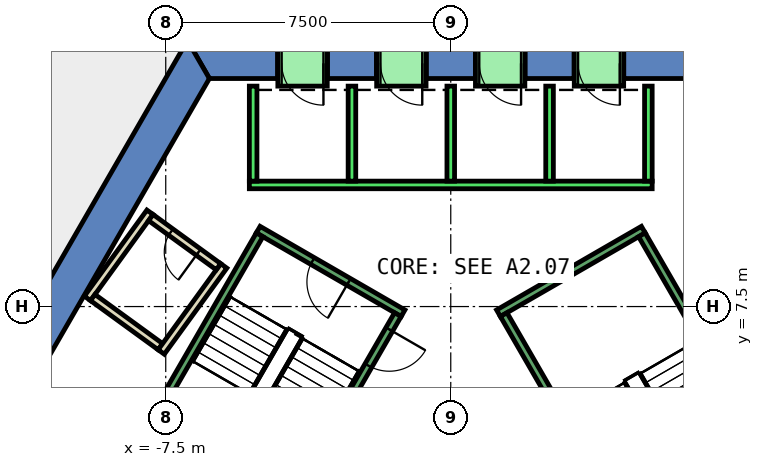
"""IFC4 building model, lengths in metres.
Left out: names, types, materials, properties, quantities, classifications, styles, units other than length and angle.
Written with IfcOpenShell. Run it as: python <this file> out.ifc"""

import sys

from ifc_helpers import new_model, si_unit, direction, frame, frame_2d, origin, place, context, subcontext, project, spatial, polyline, rectangle, outline, extrude, element, fill, save


model = new_model("IFC4")
c1 = context("Model", 3, precision=1e-05, world=origin(), true_north=direction((0.0, 1.0)))
c2 = subcontext(c1, "Body", "Model", "MODEL_VIEW")
j1 = project(units=[si_unit("LENGTHUNIT", "METRE"), si_unit("PLANEANGLEUNIT", "RADIAN")], contexts=[c1])
p1 = place(None, origin())
s1 = spatial("IfcSite", under=j1, at=p1, CompositionType="ELEMENT")
p2 = place(p1, origin())
s2 = spatial("IfcBuilding", under=s1, at=p2, CompositionType="ELEMENT")
p3 = place(p2, frame((0.0, 0.0, 20.0)))
s3 = spatial("IfcBuildingStorey", under=s2, at=p3, CompositionType="ELEMENT", Elevation=20.0)
p4 = place(p3, frame((0.0, 0.0, -0.45)))
e1 = element("IfcWall", 1, at=p4, inside=s3, PredefinedType="SHEAR", context=c2, shape_type="SweptSolid", body=[
    extrude(outline(polyline([(4.55, 14.5), (4.55, 13.5), (6.351, 13.5), (6.928, 14.5), (4.55, 14.5)])), origin(), (0.0, 0.0, 1.0), 5.0),
])
p5 = place(p3, frame((0.0, 0.0, -0.45)))
e2 = element("IfcWall", 2, at=p5, inside=s3, PredefinedType="SHEAR", context=c2, shape_type="SweptSolid", body=[
    extrude(outline(polyline([(1.95, 14.5), (1.95, 13.5), (3.25, 13.5), (3.25, 14.5), (1.95, 14.5)])), origin(), (0.0, 0.0, 1.0), 5.0),
])
p6 = place(p3, frame((0.0, 0.0, -0.45)))
e3 = element("IfcWall", 3, at=p6, inside=s3, PredefinedType="SHEAR", context=c2, shape_type="SweptSolid", body=[
    extrude(outline(polyline([(-0.65, 14.5), (-0.65, 13.5), (0.65, 13.5), (0.65, 14.5), (-0.65, 14.5)])), origin(), (0.0, 0.0, 1.0), 5.0),
])
p7 = place(p3, frame((0.0, 0.0, -0.45)))
e4 = element("IfcWall", 4, at=p7, inside=s3, PredefinedType="SHEAR", context=c2, shape_type="SweptSolid", body=[
    extrude(outline(polyline([(-3.25, 14.5), (-3.25, 13.5), (-1.95, 13.5), (-1.95, 14.5), (-3.25, 14.5)])), origin(), (0.0, 0.0, 1.0), 5.0),
])
p8 = place(p3, frame((0.0, 0.0, -0.45)))
e5 = element("IfcWall", 5, at=p8, inside=s3, PredefinedType="SHEAR", context=c2, shape_type="SweptSolid", body=[
    extrude(outline(polyline([(-4.55, 13.5), (-4.55, 14.5), (-6.928, 14.5), (-6.351, 13.5), (-4.55, 13.5)])), origin(), (0.0, 0.0, 1.0), 5.0),
])
p9 = place(p3, frame((0.0, 0.0, 3.6)))
e6 = element("IfcWall", 6, at=p9, inside=s3, PredefinedType="SHEAR", context=c2, shape_type="SweptSolid", body=[
    extrude(outline(polyline([(3.25, 14.5), (3.25, 13.5), (4.55, 13.5), (4.55, 14.5), (3.25, 14.5)])), origin(), (0.0, 0.0, 1.0), 0.95),
])
p10 = place(p3, frame((0.0, 0.0, 3.6)))
e7 = element("IfcWall", 7, at=p10, inside=s3, PredefinedType="SHEAR", context=c2, shape_type="SweptSolid", body=[
    extrude(outline(polyline([(0.65, 14.5), (0.65, 13.5), (1.95, 13.5), (1.95, 14.5), (0.65, 14.5)])), origin(), (0.0, 0.0, 1.0), 0.95),
])
p11 = place(p3, frame((0.0, 0.0, 3.6)))
e8 = element("IfcWall", 8, at=p11, inside=s3, PredefinedType="SHEAR", context=c2, shape_type="SweptSolid", body=[
    extrude(outline(polyline([(-1.95, 14.5), (-1.95, 13.5), (-0.65, 13.5), (-0.65, 14.5), (-1.95, 14.5)])), origin(), (0.0, 0.0, 1.0), 0.95),
])
p12 = place(p3, frame((0.0, 0.0, 3.6)))
e9 = element("IfcWall", 9, at=p12, inside=s3, PredefinedType="SHEAR", context=c2, shape_type="SweptSolid", body=[
    extrude(outline(polyline([(-4.55, 14.5), (-4.55, 13.5), (-3.25, 13.5), (-3.25, 14.5), (-4.55, 14.5)])), origin(), (0.0, 0.0, 1.0), 0.95),
])
p13 = place(p3, frame((0.0, 0.0, -0.45)))
e10 = element("IfcWall", 10, at=p13, inside=s3, PredefinedType="SHEAR", context=c2, shape_type="SweptSolid", body=[
    extrude(outline(polyline([(-12.267, 5.252), (-11.402, 4.752), (-6.351, 13.5), (-6.928, 14.5), (-12.267, 5.252)])), origin(), (0.0, 0.0, 1.0), 5.0),
])
p14 = place(p3, frame((-7.915, 9.981, 0.0), z_axis=(0.0, 0.0, 1.0), x_axis=(-0.587497525331, -0.809225962096, 0.0)))
e11 = element("IfcWall", 11, at=p14, inside=s3, PredefinedType="PARTITIONING", context=c2, shape_type="SweptSolid", body=[
    extrude(rectangle(XDim=2.8, YDim=0.2, at=frame_2d((1.4, 0.0))), origin(), (0.0, 0.0, 1.0), 4.55),
])
p15 = place(p3, frame((-9.421, 7.738, 0.0), z_axis=(0.0, 0.0, 1.0), x_axis=(0.808832031072, -0.588039748242, 0.0)))
e12 = element("IfcWall", 12, at=p15, inside=s3, PredefinedType="PARTITIONING", context=c2, shape_type="SweptSolid", body=[
    extrude(rectangle(XDim=2.2, YDim=0.2, at=frame_2d((1.1, 0.0))), origin(), (0.0, 0.0, 1.0), 4.55),
])
p16 = place(p3, frame((-7.619, 6.305, 0.0), z_axis=(0.0, 0.0, 1.0), x_axis=(0.58785021813, 0.808969789945, 0.0)))
e13 = element("IfcWall", 13, at=p16, inside=s3, PredefinedType="PARTITIONING", context=c2, shape_type="SweptSolid", body=[
    extrude(rectangle(XDim=2.8, YDim=0.2, at=frame_2d((1.4, 0.0))), origin(), (0.0, 0.0, 1.0), 4.55),
])
p17 = place(p3, frame((-6.113, 8.548, 0.0), z_axis=(0.0, 0.0, 1.0), x_axis=(-0.808928058073, 0.587907643139, 0.0)))
e14 = element("IfcWall", 14, at=p17, inside=s3, PredefinedType="PARTITIONING", context=c2, shape_type="SweptSolid", body=[
    extrude(rectangle(XDim=2.199, YDim=0.2, at=frame_2d((1.1, 0.0))), origin(), (0.0, 0.0, 1.0), 4.55),
])
p18 = place(p17, frame((0.65, 0.0, 0.0)))
e15 = element("IfcOpeningElement", 15, at=p18, cuts=e14, PredefinedType="OPENING", context=c2, shape_type="SweptSolid", body=[
    extrude(rectangle(XDim=0.9, YDim=2.1, at=frame_2d((0.45, 1.05))), frame((0.0, 0.11, 0.0), z_axis=(0.0, -1.0, 0.0), x_axis=(1.0, 0.0, 0.0)), (0.0, 0.0, 1.0), 0.22),
])
p19 = place(p3, frame((5.3, 10.7, 0.0), z_axis=(0.0, 0.0, 1.0), x_axis=(-1.0, 0.0, 0.0)))
e16 = element("IfcWall", 16, at=p19, inside=s3, PredefinedType="STANDARD", context=c2, shape_type="SweptSolid", body=[
    extrude(rectangle(XDim=10.6, YDim=0.2, at=frame_2d((5.3, 0.0))), origin(), (0.0, 0.0, 1.0), 4.55),
])
for number, where, z_axis, x_axis in (
    (17, (5.2, 10.8, 0.0), (0.0, 0.0, 1.0), (0.0, 1.0, 0.0)),
    (18, (2.6, 10.8, 0.0), (0.0, 0.0, 1.0), (0.0, 1.0, 0.0)),
    (19, (0.0, 10.8, 0.0), (0.0, 0.0, 1.0), (0.0, 1.0, 0.0)),
    (20, (-2.6, 10.8, 0.0), (0.0, 0.0, 1.0), (0.0, 1.0, 0.0)),
    (21, (-5.2, 10.8, 0.0), (0.0, 0.0, 1.0), (0.0, 1.0, 0.0)),
):
    element("IfcWall", number, at=place(p3, frame(where, z_axis=z_axis, x_axis=x_axis)), inside=s3, PredefinedType="STANDARD", context=c2, shape_type="SweptSolid", body=[
        extrude(rectangle(XDim=2.5, YDim=0.2, at=frame_2d((1.25, 0.0))), origin(), (0.0, 0.0, 1.0), 4.55),
    ])
p20 = place(p3, frame((4.55, 13.9, 0.0), z_axis=(0.0, 0.0, 1.0), x_axis=(-1.0, 0.0, 0.0)))
e22 = element("IfcWall", 22, at=p20, inside=s3, PredefinedType="STANDARD", context=c2, shape_type="SweptSolid", body=[
    extrude(rectangle(XDim=1.3, YDim=1.2, at=frame_2d((0.65, 0.0))), origin(), (0.0, 0.0, 1.0), 2.4),
])
p21 = place(p20, frame((0.1, 0.0, 0.0)))
e23 = element("IfcOpeningElement", 23, at=p21, cuts=e22, PredefinedType="OPENING", context=c2, shape_type="SweptSolid", body=[
    extrude(rectangle(XDim=1.1, YDim=2.3, at=frame_2d((0.55, 1.15))), frame((0.0, 0.61, 0.0), z_axis=(0.0, -1.0, 0.0), x_axis=(1.0, 0.0, 0.0)), (0.0, 0.0, 1.0), 1.22),
])
p22 = place(p3, frame((1.95, 13.9, 0.0), z_axis=(0.0, 0.0, 1.0), x_axis=(-1.0, 0.0, 0.0)))
e24 = element("IfcWall", 24, at=p22, inside=s3, PredefinedType="STANDARD", context=c2, shape_type="SweptSolid", body=[
    extrude(rectangle(XDim=1.3, YDim=1.2, at=frame_2d((0.65, 0.0))), origin(), (0.0, 0.0, 1.0), 2.4),
])
p23 = place(p22, frame((0.1, 0.0, 0.0)))
e25 = element("IfcOpeningElement", 25, at=p23, cuts=e24, PredefinedType="OPENING", context=c2, shape_type="SweptSolid", body=[
    extrude(rectangle(XDim=1.1, YDim=2.3, at=frame_2d((0.55, 1.15))), frame((0.0, 0.61, 0.0), z_axis=(0.0, -1.0, 0.0), x_axis=(1.0, 0.0, 0.0)), (0.0, 0.0, 1.0), 1.22),
])
p24 = place(p3, frame((-0.65, 13.9, 0.0), z_axis=(0.0, 0.0, 1.0), x_axis=(-1.0, 0.0, 0.0)))
e26 = element("IfcWall", 26, at=p24, inside=s3, PredefinedType="STANDARD", context=c2, shape_type="SweptSolid", body=[
    extrude(rectangle(XDim=1.3, YDim=1.2, at=frame_2d((0.65, 0.0))), origin(), (0.0, 0.0, 1.0), 2.4),
])
p25 = place(p24, frame((0.1, 0.0, 0.0)))
e27 = element("IfcOpeningElement", 27, at=p25, cuts=e26, PredefinedType="OPENING", context=c2, shape_type="SweptSolid", body=[
    extrude(rectangle(XDim=1.1, YDim=2.3, at=frame_2d((0.55, 1.15))), frame((0.0, 0.61, 0.0), z_axis=(0.0, -1.0, 0.0), x_axis=(1.0, 0.0, 0.0)), (0.0, 0.0, 1.0), 1.22),
])
p26 = place(p3, frame((-3.25, 13.9, 0.0), z_axis=(0.0, 0.0, 1.0), x_axis=(-1.0, 0.0, 0.0)))
e28 = element("IfcWall", 28, at=p26, inside=s3, PredefinedType="STANDARD", context=c2, shape_type="SweptSolid", body=[
    extrude(rectangle(XDim=1.3, YDim=1.2, at=frame_2d((0.65, 0.0))), origin(), (0.0, 0.0, 1.0), 2.4),
])
p27 = place(p26, frame((0.1, 0.0, 0.0)))
e29 = element("IfcOpeningElement", 29, at=p27, cuts=e28, PredefinedType="OPENING", context=c2, shape_type="SweptSolid", body=[
    extrude(rectangle(XDim=1.1, YDim=2.3, at=frame_2d((0.55, 1.15))), frame((0.0, 0.61, 0.0), z_axis=(0.0, -1.0, 0.0), x_axis=(1.0, 0.0, 0.0)), (0.0, 0.0, 1.0), 1.22),
])
p28 = place(p3, frame((1.256, 7.324, 0.0), z_axis=(0.0, 0.0, 1.0), x_axis=(0.866046073146, 0.499964197906, 0.0)))
e30 = element("IfcWall", 30, at=p28, inside=s3, PredefinedType="STANDARD", context=c2, shape_type="SweptSolid", body=[
    extrude(rectangle(XDim=4.4, YDim=0.2, at=frame_2d((2.2, 0.0))), origin(), (0.0, 0.0, 1.0), 4.55),
])
p29 = place(p3, frame((4.843, 1.312, 0.0), z_axis=(0.0, 0.0, 1.0), x_axis=(-0.499963383562, 0.866046543262, 0.0)))
e31 = element("IfcWall", 31, at=p29, inside=s3, PredefinedType="STANDARD", context=c2, shape_type="SweptSolid", body=[
    extrude(rectangle(XDim=6.9, YDim=0.2, at=frame_2d((3.45, 0.0))), origin(), (0.0, 0.0, 1.0), 4.55),
])
p30 = place(p29, frame((0.45, 0.0, 0.0)))
e32 = element("IfcOpeningElement", 32, at=p30, cuts=e31, PredefinedType="OPENING", context=c2, shape_type="SweptSolid", body=[
    extrude(rectangle(XDim=1.1, YDim=2.2, at=frame_2d((0.55, 1.1))), frame((0.0, 0.11, 0.0), z_axis=(0.0, -1.0, 0.0), x_axis=(1.0, 0.0, 0.0)), (0.0, 0.0, 1.0), 0.22),
])
p31 = place(p3, frame((8.48, 3.412, 0.0), z_axis=(0.0, 0.0, 1.0), x_axis=(-0.499978703459, 0.866037698999, 0.0)))
e33 = element("IfcWall", 33, at=p31, inside=s3, PredefinedType="STANDARD", context=c2, shape_type="SweptSolid", body=[
    extrude(rectangle(XDim=6.9, YDim=0.2, at=frame_2d((3.45, 0.0))), origin(), (0.0, 0.0, 1.0), 4.55),
])
p32 = place(p3, frame((-1.256, 7.324, 0.0), z_axis=(0.0, 0.0, 1.0), x_axis=(-0.866046073146, 0.499964197906, 0.0)))
e34 = element("IfcWall", 34, at=p32, inside=s3, PredefinedType="STANDARD", context=c2, shape_type="SweptSolid", body=[
    extrude(rectangle(XDim=4.4, YDim=0.2, at=frame_2d((2.2, 0.0))), origin(), (0.0, 0.0, 1.0), 4.55),
])
p33 = place(p32, frame((1.65, 0.0, 0.0)))
e35 = element("IfcOpeningElement", 35, at=p33, cuts=e34, PredefinedType="OPENING", context=c2, shape_type="SweptSolid", body=[
    extrude(rectangle(XDim=1.1, YDim=2.2, at=frame_2d((0.55, 1.1))), frame((0.0, 0.11, 0.0), z_axis=(0.0, -1.0, 0.0), x_axis=(1.0, 0.0, 0.0)), (0.0, 0.0, 1.0), 0.22),
])
p34 = place(p3, frame((-1.393, 7.288, 0.0), z_axis=(0.0, 0.0, 1.0), x_axis=(-0.499963383562, -0.866046543262, 0.0)))
e36 = element("IfcWall", 36, at=p34, inside=s3, PredefinedType="STANDARD", context=c2, shape_type="SweptSolid", body=[
    extrude(rectangle(XDim=6.9, YDim=0.2, at=frame_2d((3.45, 0.0))), origin(), (0.0, 0.0, 1.0), 4.55),
])
p35 = place(p34, frame((0.45, 0.0, 0.0)))
e37 = element("IfcOpeningElement", 37, at=p35, cuts=e36, PredefinedType="OPENING", context=c2, shape_type="SweptSolid", body=[
    extrude(rectangle(XDim=1.1, YDim=2.2, at=frame_2d((0.55, 1.1))), frame((0.0, 0.11, 0.0), z_axis=(0.0, -1.0, 0.0), x_axis=(1.0, 0.0, 0.0)), (0.0, 0.0, 1.0), 0.22),
])
p36 = place(p3, frame((-5.03, 9.388, 0.0), z_axis=(0.0, 0.0, 1.0), x_axis=(-0.499978703459, -0.866037698999, 0.0)))
e38 = element("IfcWall", 38, at=p36, inside=s3, PredefinedType="STANDARD", context=c2, shape_type="SweptSolid", body=[
    extrude(rectangle(XDim=6.9, YDim=0.2, at=frame_2d((3.45, 0.0))), origin(), (0.0, 0.0, 1.0), 4.55),
])
p37 = place(p18, origin())
e39 = element("IfcDoor", 39, at=p37, inside=s3, OperationType="SINGLE_SWING_LEFT", PredefinedType="DOOR", context=c2, shape_type="SweptSolid", body=[
    extrude(rectangle(XDim=0.9, YDim=2.1, at=frame_2d((0.45, 1.05))), frame((0.0, 0.025, 0.0), z_axis=(0.0, -1.0, 0.0), x_axis=(1.0, 0.0, 0.0)), (0.0, 0.0, 1.0), 0.05),
])
fill(e15, e39)
p38 = place(p21, origin())
e40 = element("IfcDoor", 40, at=p38, inside=s3, OperationType="SLIDING_TO_LEFT", PredefinedType="DOOR", context=c2, shape_type="SweptSolid", body=[
    extrude(rectangle(XDim=1.1, YDim=2.3, at=frame_2d((0.55, 1.15))), frame((0.0, 0.025, 0.0), z_axis=(0.0, -1.0, 0.0), x_axis=(1.0, 0.0, 0.0)), (0.0, 0.0, 1.0), 0.05),
])
fill(e23, e40)
p39 = place(p23, origin())
e41 = element("IfcDoor", 41, at=p39, inside=s3, OperationType="SLIDING_TO_LEFT", PredefinedType="DOOR", context=c2, shape_type="SweptSolid", body=[
    extrude(rectangle(XDim=1.1, YDim=2.3, at=frame_2d((0.55, 1.15))), frame((0.0, 0.025, 0.0), z_axis=(0.0, -1.0, 0.0), x_axis=(1.0, 0.0, 0.0)), (0.0, 0.0, 1.0), 0.05),
])
fill(e25, e41)
p40 = place(p25, origin())
e42 = element("IfcDoor", 42, at=p40, inside=s3, OperationType="SLIDING_TO_LEFT", PredefinedType="DOOR", context=c2, shape_type="SweptSolid", body=[
    extrude(rectangle(XDim=1.1, YDim=2.3, at=frame_2d((0.55, 1.15))), frame((0.0, 0.025, 0.0), z_axis=(0.0, -1.0, 0.0), x_axis=(1.0, 0.0, 0.0)), (0.0, 0.0, 1.0), 0.05),
])
fill(e27, e42)
p41 = place(p27, origin())
e43 = element("IfcDoor", 43, at=p41, inside=s3, OperationType="SLIDING_TO_LEFT", PredefinedType="DOOR", context=c2, shape_type="SweptSolid", body=[
    extrude(rectangle(XDim=1.1, YDim=2.3, at=frame_2d((0.55, 1.15))), frame((0.0, 0.025, 0.0), z_axis=(0.0, -1.0, 0.0), x_axis=(1.0, 0.0, 0.0)), (0.0, 0.0, 1.0), 0.05),
])
fill(e29, e43)
p42 = place(p35, origin())
e44 = element("IfcDoor", 44, at=p42, inside=s3, OperationType="SINGLE_SWING_LEFT", PredefinedType="DOOR", context=c2, shape_type="SweptSolid", body=[
    extrude(rectangle(XDim=1.1, YDim=2.2, at=frame_2d((0.55, 1.1))), frame((0.0, 0.025, 0.0), z_axis=(0.0, -1.0, 0.0), x_axis=(1.0, 0.0, 0.0)), (0.0, 0.0, 1.0), 0.05),
])
fill(e37, e44)
p43 = place(p33, origin())
e45 = element("IfcDoor", 45, at=p43, inside=s3, OperationType="SINGLE_SWING_LEFT", PredefinedType="DOOR", context=c2, shape_type="SweptSolid", body=[
    extrude(rectangle(XDim=1.1, YDim=2.2, at=frame_2d((0.55, 1.1))), frame((0.0, 0.025, 0.0), z_axis=(0.0, -1.0, 0.0), x_axis=(1.0, 0.0, 0.0)), (0.0, 0.0, 1.0), 0.05),
])
fill(e35, e45)
save(model, sys.argv[1])
